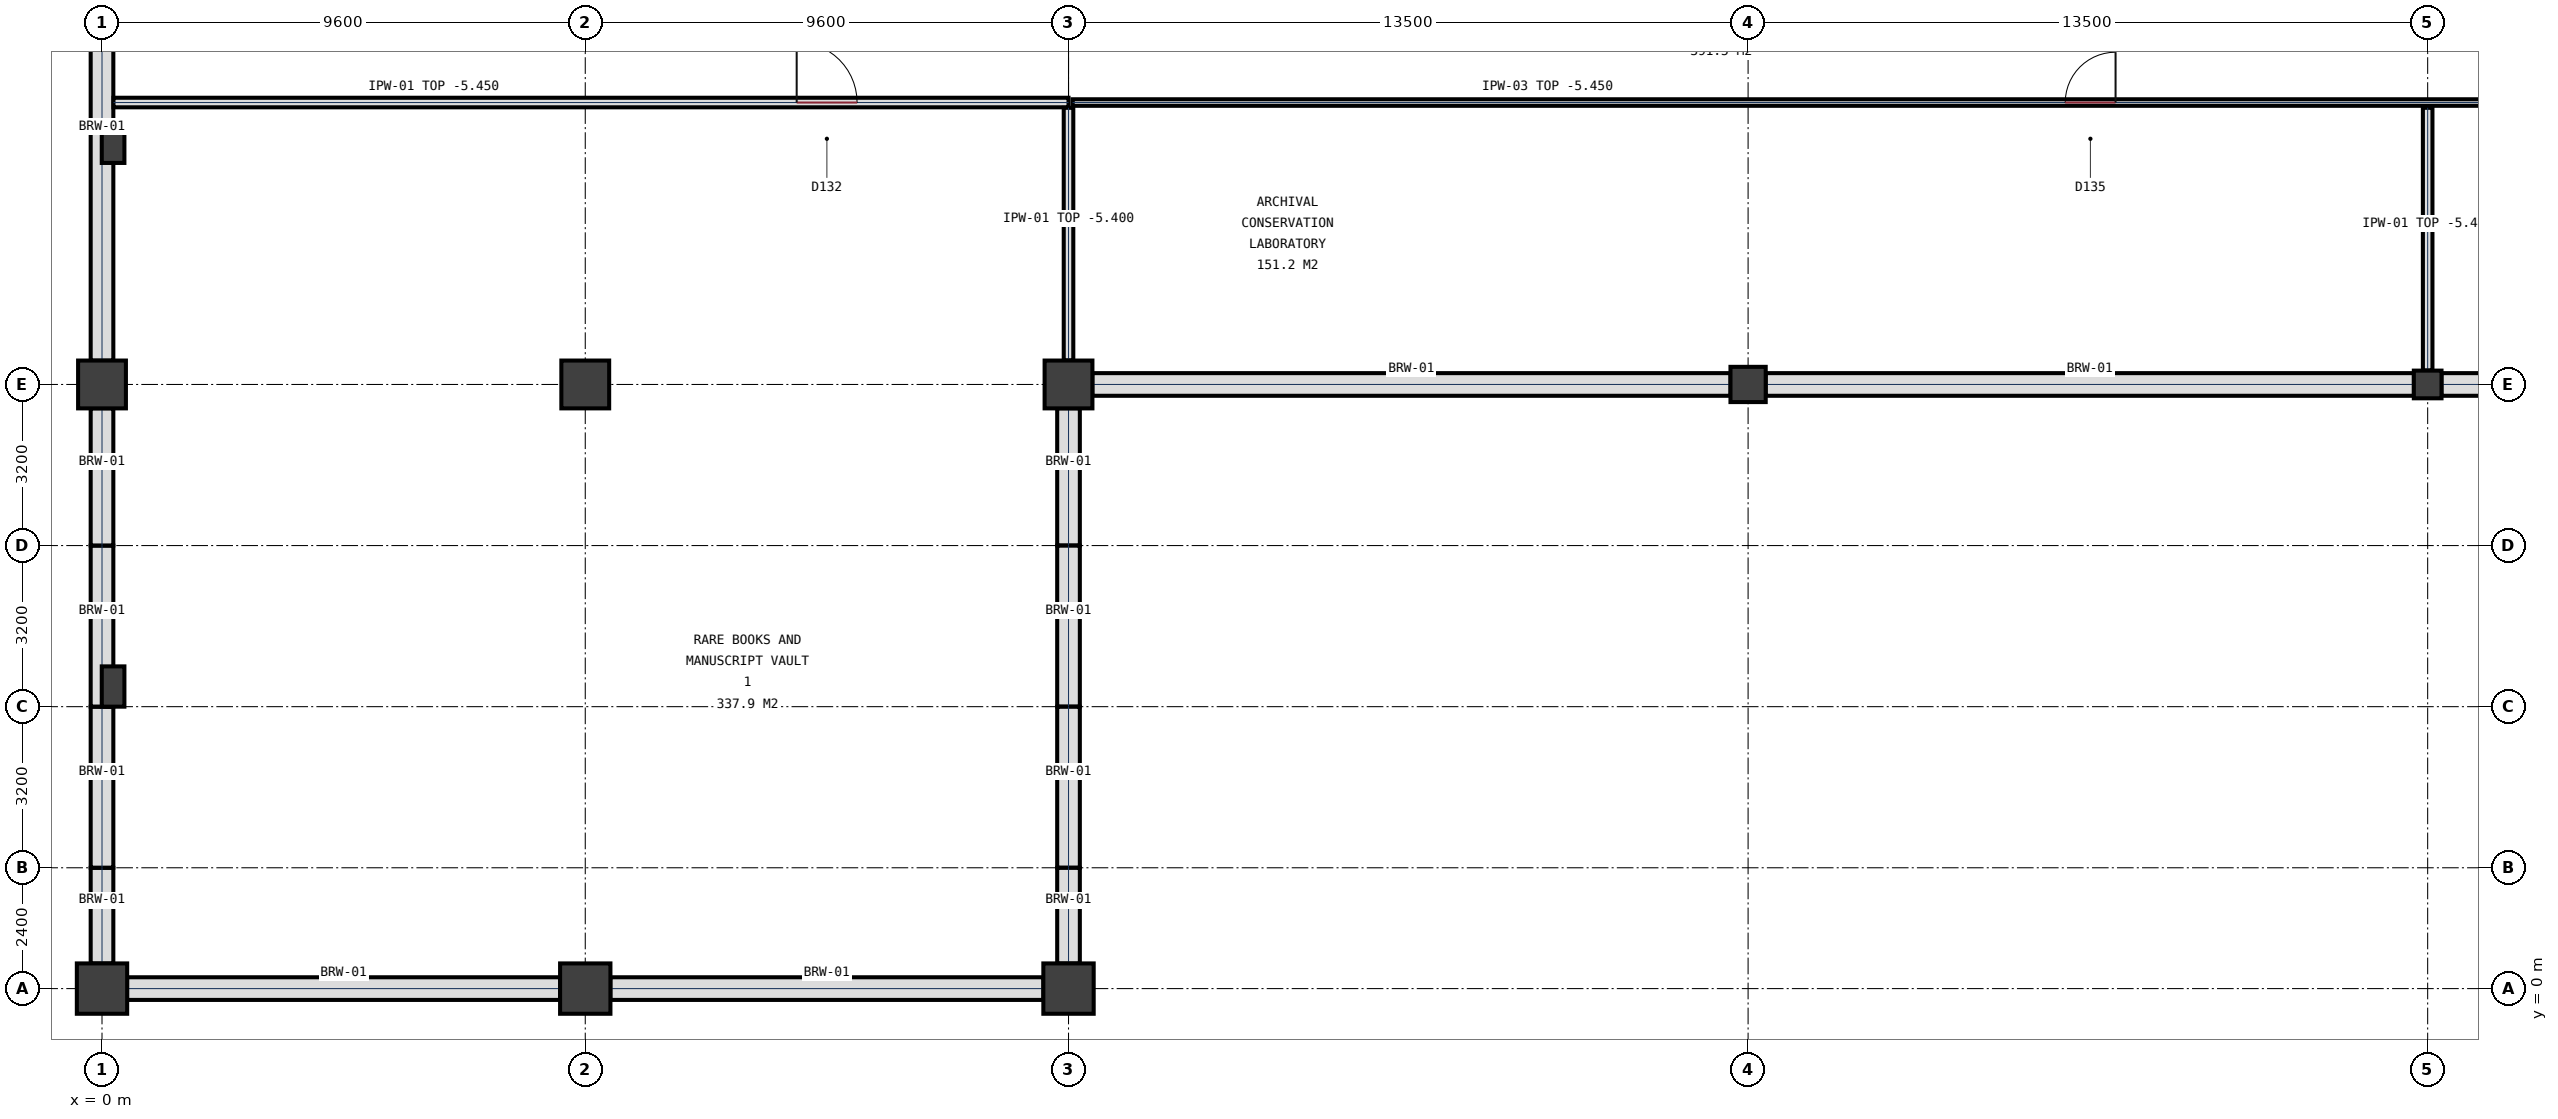
"""IFC4 building model, lengths in metres.
Left out: names, types, materials, properties, quantities, classifications, styles, units other than length and angle.
Written with IfcOpenShell. Run it as: python <this file> out.ifc"""

import sys

from ifc_helpers import new_model, si_unit, direction, frame, frame_2d, origin, origin_with_axes, origin_2d, place, context, subcontext, project, spatial, rectangle, extrude, element, fill, save


model = new_model("IFC4")
c1 = context("Model", 3, precision=1e-05, world=origin(), true_north=direction((0.0, 1.0)))
c2 = subcontext(c1, "Body", "Model", "MODEL_VIEW")
j1 = project(units=[si_unit("LENGTHUNIT", "METRE"), si_unit("PLANEANGLEUNIT", "RADIAN")], contexts=[c1])
p1 = place(None, origin())
s1 = spatial("IfcSite", under=j1, at=p1, CompositionType="ELEMENT")
p2 = place(p1, origin())
s2 = spatial("IfcBuilding", under=s1, at=p2, CompositionType="ELEMENT")
p3 = place(p2, frame((0.0, 0.0, -8.4)))
s3 = spatial("IfcBuildingStorey", under=s2, at=p3, CompositionType="ELEMENT", Elevation=-8.4)
p4 = place(p3, origin_with_axes())
e1 = element("IfcColumn", 1, at=p4, inside=s3, PredefinedType="COLUMN", context=c2, shape_type="SweptSolid", body=[
    extrude(rectangle(XDim=1.0, YDim=1.0, at=origin_2d()), origin(), (0.0, 0.0, 1.0), 4.2),
])
p5 = place(p3, frame((0.0, 12.0, 0.0), z_axis=(0.0, 0.0, 1.0), x_axis=(1.0, 0.0, 0.0)))
e2 = element("IfcColumn", 2, at=p5, inside=s3, PredefinedType="COLUMN", context=c2, shape_type="SweptSolid", body=[
    extrude(rectangle(XDim=0.95, YDim=0.95, at=origin_2d()), origin(), (0.0, 0.0, 1.0), 4.2),
])
p6 = place(p3, frame((9.6, 0.0, 0.0), z_axis=(0.0, 0.0, 1.0), x_axis=(1.0, 0.0, 0.0)))
e3 = element("IfcColumn", 3, at=p6, inside=s3, PredefinedType="COLUMN", context=c2, shape_type="SweptSolid", body=[
    extrude(rectangle(XDim=1.0, YDim=1.0, at=origin_2d()), origin(), (0.0, 0.0, 1.0), 4.2),
])
p7 = place(p3, frame((9.6, 12.0, 0.0), z_axis=(0.0, 0.0, 1.0), x_axis=(1.0, 0.0, 0.0)))
e4 = element("IfcColumn", 4, at=p7, inside=s3, PredefinedType="COLUMN", context=c2, shape_type="SweptSolid", body=[
    extrude(rectangle(XDim=0.95, YDim=0.95, at=origin_2d()), origin(), (0.0, 0.0, 1.0), 4.2),
])
p8 = place(p3, frame((19.2, 0.0, 0.0), z_axis=(0.0, 0.0, 1.0), x_axis=(1.0, 0.0, 0.0)))
e5 = element("IfcColumn", 5, at=p8, inside=s3, PredefinedType="COLUMN", context=c2, shape_type="SweptSolid", body=[
    extrude(rectangle(XDim=1.0, YDim=1.0, at=origin_2d()), origin(), (0.0, 0.0, 1.0), 4.2),
])
p9 = place(p3, frame((19.2, 12.0, 0.0), z_axis=(0.0, 0.0, 1.0), x_axis=(1.0, 0.0, 0.0)))
e6 = element("IfcColumn", 6, at=p9, inside=s3, PredefinedType="COLUMN", context=c2, shape_type="SweptSolid", body=[
    extrude(rectangle(XDim=0.95, YDim=0.95, at=origin_2d()), origin(), (0.0, 0.0, 1.0), 4.2),
])
p10 = place(p3, frame((32.7, 12.0, 0.0), z_axis=(0.0, 0.0, 1.0), x_axis=(1.0, 0.0, 0.0)))
e7 = element("IfcColumn", 7, at=p10, inside=s3, PredefinedType="COLUMN", context=c2, shape_type="SweptSolid", body=[
    extrude(rectangle(XDim=0.7, YDim=0.7, at=origin_2d()), origin(), (0.0, 0.0, 1.0), 4.2),
])
p11 = place(p3, frame((46.2, 12.0, 0.0), z_axis=(0.0, 0.0, 1.0), x_axis=(1.0, 0.0, 0.0)))
e8 = element("IfcColumn", 8, at=p11, inside=s3, PredefinedType="COLUMN", context=c2, shape_type="SweptSolid", body=[
    extrude(rectangle(XDim=0.55, YDim=0.55, at=origin_2d()), origin(), (0.0, 0.0, 1.0), 4.2),
])
for number, where, z_axis, x_axis in (
    (9, (0.22, 6.0, 0.0), (0.0, 0.0, 1.0), (1.0, 0.0, 0.0)),
    (10, (0.22, 16.8, 0.0), (0.0, 0.0, 1.0), (1.0, 0.0, 0.0)),
):
    element("IfcColumn", number, at=place(p3, frame(where, z_axis=z_axis, x_axis=x_axis)), inside=s3, PredefinedType="PILASTER", context=c2, shape_type="SweptSolid", body=[
        extrude(rectangle(XDim=0.45, YDim=0.8, at=origin_2d()), origin(), (0.0, 0.0, 1.0), 4.2),
    ])
p12 = place(p3, frame((59.302, 12.0, 0.0), z_axis=(0.0, 0.0, 1.0), x_axis=(-1.0, 0.0, 0.0)))
e11 = element("IfcWall", 11, at=p12, inside=s3, PredefinedType="USERDEFINED", context=c2, shape_type="SweptSolid", body=[
    extrude(rectangle(XDim=12.829, YDim=0.45, at=frame_2d((6.415, 0.0))), origin(), (0.0, 0.0, 1.0), 3.86),
])
p13 = place(p3, frame((45.927, 12.0, 0.0), z_axis=(0.0, 0.0, 1.0), x_axis=(-1.0, 0.0, 0.0)))
e12 = element("IfcWall", 12, at=p13, inside=s3, PredefinedType="USERDEFINED", context=c2, shape_type="SweptSolid", body=[
    extrude(rectangle(XDim=12.879, YDim=0.45, at=frame_2d((6.439, 0.0))), origin(), (0.0, 0.0, 1.0), 3.86),
])
p14 = place(p3, frame((32.352, 12.0, 0.0), z_axis=(0.0, 0.0, 1.0), x_axis=(-1.0, 0.0, 0.0)))
e13 = element("IfcWall", 13, at=p14, inside=s3, PredefinedType="USERDEFINED", context=c2, shape_type="SweptSolid", body=[
    extrude(rectangle(XDim=12.679, YDim=0.45, at=frame_2d((6.339, 0.0))), origin(), (0.0, 0.0, 1.0), 3.86),
])
p15 = place(p3, frame((19.2, 11.527, 0.0), z_axis=(0.0, 0.0, 1.0), x_axis=(0.0, -1.0, 0.0)))
e14 = element("IfcWall", 14, at=p15, inside=s3, PredefinedType="USERDEFINED", context=c2, shape_type="SweptSolid", body=[
    extrude(rectangle(XDim=2.725, YDim=0.45, at=frame_2d((1.363, 0.0))), origin(), (0.0, 0.0, 1.0), 3.86),
])
p16 = place(p3, frame((19.2, 8.798, 0.0), z_axis=(0.0, 0.0, 1.0), x_axis=(0.0, -1.0, 0.0)))
e15 = element("IfcWall", 15, at=p16, inside=s3, PredefinedType="USERDEFINED", context=c2, shape_type="SweptSolid", body=[
    extrude(rectangle(XDim=3.196, YDim=0.45, at=frame_2d((1.598, 0.0))), origin(), (0.0, 0.0, 1.0), 3.86),
])
p17 = place(p3, frame((19.2, 5.598, 0.0), z_axis=(0.0, 0.0, 1.0), x_axis=(0.0, -1.0, 0.0)))
e16 = element("IfcWall", 16, at=p17, inside=s3, PredefinedType="USERDEFINED", context=c2, shape_type="SweptSolid", body=[
    extrude(rectangle(XDim=3.196, YDim=0.45, at=frame_2d((1.598, 0.0))), origin(), (0.0, 0.0, 1.0), 3.86),
])
p18 = place(p3, frame((19.2, 2.398, 0.0), z_axis=(0.0, 0.0, 1.0), x_axis=(0.0, -1.0, 0.0)))
e17 = element("IfcWall", 17, at=p18, inside=s3, PredefinedType="USERDEFINED", context=c2, shape_type="SweptSolid", body=[
    extrude(rectangle(XDim=1.9, YDim=0.45, at=frame_2d((0.95, 0.0))), origin(), (0.0, 0.0, 1.0), 3.86),
])
for number, where, z_axis, x_axis in (
    (18, (18.702, 0.0, 0.0), (0.0, 0.0, 1.0), (-1.0, 0.0, 0.0)),
    (19, (9.102, 0.0, 0.0), (0.0, 0.0, 1.0), (-1.0, 0.0, 0.0)),
):
    element("IfcWall", number, at=place(p3, frame(where, z_axis=z_axis, x_axis=x_axis)), inside=s3, PredefinedType="USERDEFINED", context=c2, shape_type="SweptSolid", body=[
        extrude(rectangle(XDim=8.604, YDim=0.45, at=frame_2d((4.302, 0.0))), origin(), (0.0, 0.0, 1.0), 3.86),
    ])
p19 = place(p3, frame((0.0, 0.498, 0.0), z_axis=(0.0, 0.0, 1.0), x_axis=(0.0, 1.0, 0.0)))
e20 = element("IfcWall", 20, at=p19, inside=s3, PredefinedType="USERDEFINED", context=c2, shape_type="SweptSolid", body=[
    extrude(rectangle(XDim=1.9, YDim=0.45, at=frame_2d((0.95, 0.0))), origin(), (0.0, 0.0, 1.0), 3.86),
])
p20 = place(p3, frame((0.0, 2.402, 0.0), z_axis=(0.0, 0.0, 1.0), x_axis=(0.0, 1.0, 0.0)))
e21 = element("IfcWall", 21, at=p20, inside=s3, PredefinedType="USERDEFINED", context=c2, shape_type="SweptSolid", body=[
    extrude(rectangle(XDim=3.196, YDim=0.45, at=frame_2d((1.598, 0.0))), origin(), (0.0, 0.0, 1.0), 3.86),
])
p21 = place(p3, frame((0.0, 5.602, 0.0), z_axis=(0.0, 0.0, 1.0), x_axis=(0.0, 1.0, 0.0)))
e22 = element("IfcWall", 22, at=p21, inside=s3, PredefinedType="USERDEFINED", context=c2, shape_type="SweptSolid", body=[
    extrude(rectangle(XDim=3.196, YDim=0.45, at=frame_2d((1.598, 0.0))), origin(), (0.0, 0.0, 1.0), 3.86),
])
p22 = place(p3, frame((0.0, 8.802, 0.0), z_axis=(0.0, 0.0, 1.0), x_axis=(0.0, 1.0, 0.0)))
e23 = element("IfcWall", 23, at=p22, inside=s3, PredefinedType="USERDEFINED", context=c2, shape_type="SweptSolid", body=[
    extrude(rectangle(XDim=2.725, YDim=0.45, at=frame_2d((1.363, 0.0))), origin(), (0.0, 0.0, 1.0), 3.86),
])
p23 = place(p3, frame((0.0, 12.473, 0.0), z_axis=(0.0, 0.0, 1.0), x_axis=(0.0, 1.0, 0.0)))
e24 = element("IfcWall", 24, at=p23, inside=s3, PredefinedType="USERDEFINED", context=c2, shape_type="SweptSolid", body=[
    extrude(rectangle(XDim=8.679, YDim=0.45, at=frame_2d((4.34, 0.0))), origin(), (0.0, 0.0, 1.0), 3.86),
])
p24 = place(p3, frame((0.228, 17.6, 0.0), z_axis=(0.0, 0.0, 1.0), x_axis=(1.0, 0.0, 0.0)))
e25 = element("IfcWall", 25, at=p24, inside=s3, PredefinedType="PARTITIONING", context=c2, shape_type="SweptSolid", body=[
    extrude(rectangle(XDim=18.972, YDim=0.19, at=frame_2d((9.486, 0.0))), origin(), (0.0, 0.0, 1.0), 2.95),
])
p25 = place(p24, frame((13.572, 0.0, 0.0)))
e26 = element("IfcOpeningElement", 26, at=p25, cuts=e25, PredefinedType="OPENING", context=c2, shape_type="SweptSolid", body=[
    extrude(rectangle(XDim=1.2, YDim=2.2, at=frame_2d((0.6, 1.1))), frame((0.0, 0.105, 0.0), z_axis=(0.0, -1.0, 0.0), x_axis=(1.0, 0.0, 0.0)), (0.0, 0.0, 1.0), 0.21),
])
p26 = place(p3, frame((19.2, 12.478, 0.0), z_axis=(0.0, 0.0, 1.0), x_axis=(0.0, 1.0, 0.0)))
e27 = element("IfcWall", 27, at=p26, inside=s3, PredefinedType="PARTITIONING", context=c2, shape_type="SweptSolid", body=[
    extrude(rectangle(XDim=5.017, YDim=0.19, at=frame_2d((2.509, 0.0))), origin(), (0.0, 0.0, 1.0), 3.0),
])
p27 = place(p3, frame((19.28, 17.6, 0.0), z_axis=(0.0, 0.0, 1.0), x_axis=(1.0, 0.0, 0.0)))
e28 = element("IfcWall", 28, at=p27, inside=s3, PredefinedType="PARTITIONING", context=c2, shape_type="SweptSolid", body=[
    extrude(rectangle(XDim=55.67, YDim=0.13, at=frame_2d((27.835, 0.0))), origin(), (0.0, 0.0, 1.0), 2.95),
])
p28 = place(p27, frame((19.72, 0.0, 0.0)))
e29 = element("IfcOpeningElement", 29, at=p28, cuts=e28, PredefinedType="OPENING", context=c2, shape_type="SweptSolid", body=[
    extrude(rectangle(XDim=1.0, YDim=2.2, at=frame_2d((0.5, 1.1))), frame((0.0, 0.075, 0.0), z_axis=(0.0, -1.0, 0.0), x_axis=(1.0, 0.0, 0.0)), (0.0, 0.0, 1.0), 0.15),
])
p29 = place(p27, frame((46.62, 0.0, 0.0)))
e30 = element("IfcOpeningElement", 30, at=p29, cuts=e28, PredefinedType="OPENING", context=c2, shape_type="SweptSolid", body=[
    extrude(rectangle(XDim=1.0, YDim=2.2, at=frame_2d((0.5, 1.1))), frame((0.0, 0.075, 0.0), z_axis=(0.0, -1.0, 0.0), x_axis=(1.0, 0.0, 0.0)), (0.0, 0.0, 1.0), 0.15),
])
p30 = place(p3, frame((46.2, 12.278, 0.0), z_axis=(0.0, 0.0, 1.0), x_axis=(0.0, 1.0, 0.0)))
e31 = element("IfcWall", 31, at=p30, inside=s3, PredefinedType="PARTITIONING", context=c2, shape_type="SweptSolid", body=[
    extrude(rectangle(XDim=5.217, YDim=0.19, at=frame_2d((2.608, 0.0))), origin(), (0.0, 0.0, 1.0), 3.0),
])
p31 = place(p25, origin())
e32 = element("IfcDoor", 32, at=p31, inside=s3, OperationType="SINGLE_SWING_LEFT", PredefinedType="DOOR", context=c2, shape_type="SweptSolid", body=[
    extrude(rectangle(XDim=1.2, YDim=2.2, at=frame_2d((0.6, 1.1))), frame((0.0, 0.032, 0.0), z_axis=(0.0, -1.0, 0.0), x_axis=(1.0, 0.0, 0.0)), (0.0, 0.0, 1.0), 0.065),
])
fill(e26, e32)
p32 = place(p28, origin())
e33 = element("IfcDoor", 33, at=p32, inside=s3, OperationType="SINGLE_SWING_RIGHT", PredefinedType="DOOR", context=c2, shape_type="SweptSolid", body=[
    extrude(rectangle(XDim=1.0, YDim=2.2, at=frame_2d((0.5, 1.1))), frame((0.0, 0.032, 0.0), z_axis=(0.0, -1.0, 0.0), x_axis=(1.0, 0.0, 0.0)), (0.0, 0.0, 1.0), 0.065),
])
fill(e29, e33)
save(model, sys.argv[1])
